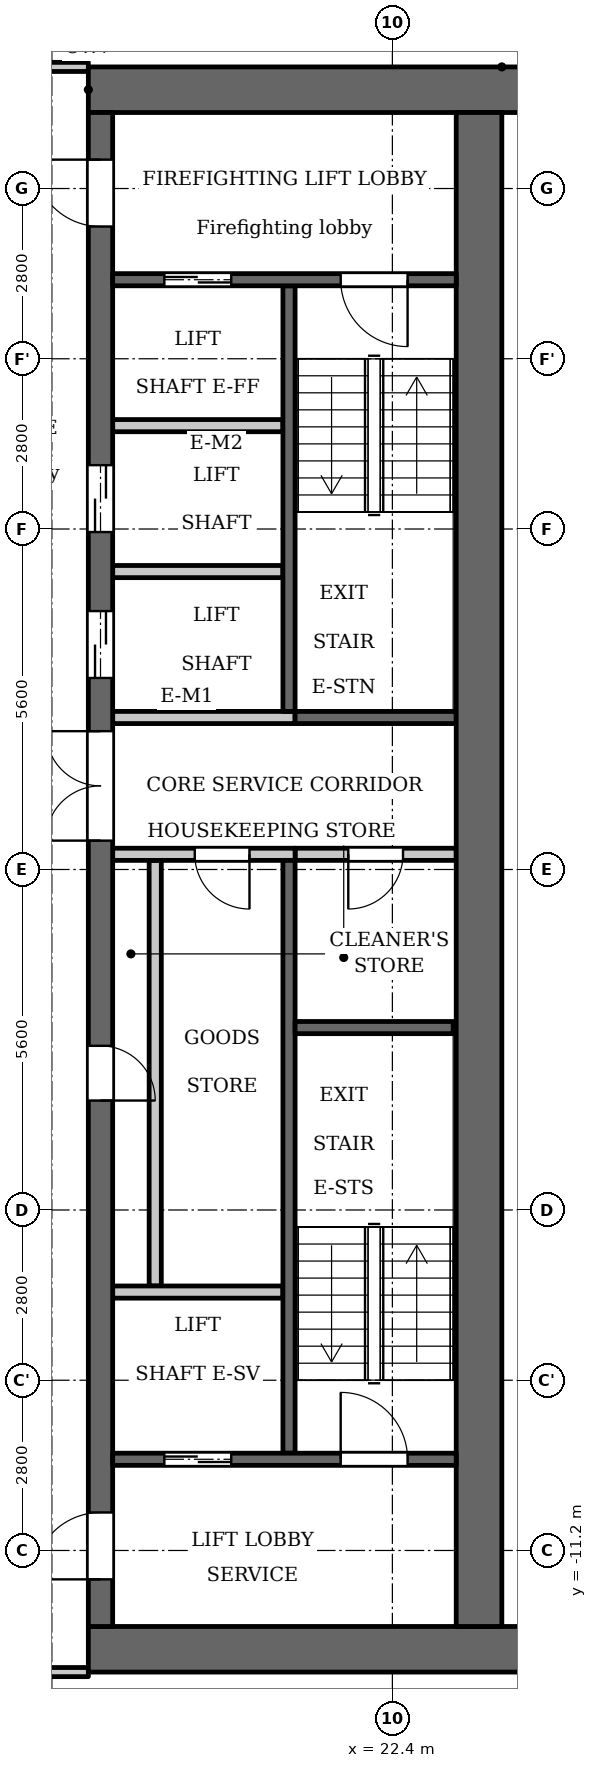
"""IFC4 building model, lengths in metres.
Left out: names, types, materials, properties, quantities, classifications, styles, units other than length and angle.
Written with IfcOpenShell. Run it as: python <this file> out.ifc"""

import sys

from ifc_helpers import new_model, si_unit, direction, frame, frame_2d, origin, place, context, subcontext, project, spatial, rectangle, extrude, element, fill, save


model = new_model("IFC4")
c1 = context("Model", 3, precision=1e-05, world=origin(), true_north=direction((0.0, 1.0)))
c2 = subcontext(c1, "Body", "Model", "MODEL_VIEW")
j1 = project(units=[si_unit("LENGTHUNIT", "METRE"), si_unit("PLANEANGLEUNIT", "RADIAN")], contexts=[c1])
p1 = place(None, origin())
s1 = spatial("IfcSite", under=j1, at=p1, CompositionType="ELEMENT")
p2 = place(p1, origin())
s2 = spatial("IfcBuilding", under=s1, at=p2, CompositionType="ELEMENT")
p3 = place(p2, frame((0.0, 0.0, 227.4)))
s3 = spatial("IfcBuildingStorey", under=s2, at=p3, CompositionType="ELEMENT", Elevation=227.4)
p4 = place(p3, frame((20.7, 2.6, 0.0), z_axis=(0.0, 0.0, 1.0), x_axis=(0.0, 1.0, 0.0)))
e1 = element("IfcWall", 1, at=p4, inside=s3, PredefinedType="SHEAR", context=c2, shape_type="SweptSolid", body=[
    extrude(rectangle(XDim=7.0, YDim=0.2, at=frame_2d((3.5, 0.0))), origin(), (0.0, 0.0, 1.0), 3.15),
])
p5 = place(p3, frame((20.7, -9.6, 0.0), z_axis=(0.0, 0.0, 1.0), x_axis=(0.0, 1.0, 0.0)))
e2 = element("IfcWall", 2, at=p5, inside=s3, PredefinedType="SHEAR", context=c2, shape_type="SweptSolid", body=[
    extrude(rectangle(XDim=9.75, YDim=0.2, at=frame_2d((4.875, 0.0))), origin(), (0.0, 0.0, 1.0), 3.15),
])
p6 = place(p3, frame((20.8, 2.5, 0.0), z_axis=(0.0, 0.0, 1.0), x_axis=(1.0, 0.0, 0.0)))
e3 = element("IfcWall", 3, at=p6, inside=s3, PredefinedType="SHEAR", context=c2, shape_type="SweptSolid", body=[
    extrude(rectangle(XDim=2.65, YDim=0.2, at=frame_2d((1.325, 0.0))), origin(), (0.0, 0.0, 1.0), 3.15),
])
p7 = place(p3, frame((20.8, 0.25, 0.0), z_axis=(0.0, 0.0, 1.0), x_axis=(1.0, 0.0, 0.0)))
e4 = element("IfcWall", 4, at=p7, inside=s3, PredefinedType="PARTITIONING", context=c2, shape_type="SweptSolid", body=[
    extrude(rectangle(XDim=2.65, YDim=0.2, at=frame_2d((1.325, 0.0))), origin(), (0.0, 0.0, 1.0), 3.15),
])
p8 = place(p7, frame((0.875, 0.0, 0.0)))
e5 = element("IfcOpeningElement", 5, at=p8, cuts=e4, PredefinedType="OPENING", context=c2, shape_type="SweptSolid", body=[
    extrude(rectangle(XDim=0.9, YDim=2.1, at=frame_2d((0.45, 1.05))), frame((0.0, 0.11, 0.0), z_axis=(0.0, -1.0, 0.0), x_axis=(1.0, 0.0, 0.0)), (0.0, 0.0, 1.0), 0.22),
])
for number, where, z_axis, x_axis in (
    (6, (17.4, 12.825, 0.0), (0.0, 0.0, 1.0), (1.0, 0.0, 0.0)),
    (7, (17.4, -12.825, 0.0), (0.0, 0.0, 1.0), (1.0, 0.0, 0.0)),
):
    element("IfcWall", number, at=place(p3, frame(where, z_axis=z_axis, x_axis=x_axis)), inside=s3, PredefinedType="SHEAR", context=c2, shape_type="SweptSolid", body=[
        extrude(rectangle(XDim=7.6, YDim=0.75, at=frame_2d((3.8, 0.0))), origin(), (0.0, 0.0, 1.0), 3.15),
    ])
p9 = place(p3, frame((18.5, -6.85, 0.0), z_axis=(0.0, 0.0, 1.0), x_axis=(0.0, 1.0, 0.0)))
e8 = element("IfcWall", 8, at=p9, inside=s3, PredefinedType="PARTITIONING", context=c2, shape_type="SweptSolid", body=[
    extrude(rectangle(XDim=7.0, YDim=0.2, at=frame_2d((3.5, 0.0))), origin(), (0.0, 0.0, 1.0), 3.15),
])
p10 = place(p3, frame((17.6, -12.45, 0.0), z_axis=(0.0, 0.0, 1.0), x_axis=(0.0, 1.0, 0.0)))
e9 = element("IfcWall", 9, at=p10, inside=s3, PredefinedType="SHEAR", context=c2, shape_type="SweptSolid", body=[
    extrude(rectangle(XDim=24.9, YDim=0.4, at=frame_2d((12.45, 0.0))), origin(), (0.0, 0.0, 1.0), 3.15),
])
p11 = place(p10, frame((8.65, 0.0, 0.0)))
e10 = element("IfcOpeningElement", 10, at=p11, cuts=e9, PredefinedType="OPENING", context=c2, shape_type="SweptSolid", body=[
    extrude(rectangle(XDim=0.9, YDim=2.1, at=frame_2d((0.45, 1.05))), frame((0.0, 0.21, 0.0), z_axis=(0.0, -1.0, 0.0), x_axis=(1.0, 0.0, 0.0)), (0.0, 0.0, 1.0), 0.42),
])
p12 = place(p10, frame((15.6, 0.0, 0.0)))
e11 = element("IfcOpeningElement", 11, at=p12, cuts=e9, PredefinedType="OPENING", context=c2, shape_type="SweptSolid", body=[
    extrude(rectangle(XDim=1.1, YDim=2.1, at=frame_2d((0.55, 1.05))), frame((0.0, 0.21, 0.0), z_axis=(0.0, -1.0, 0.0), x_axis=(1.0, 0.0, 0.0)), (0.0, 0.0, 1.0), 0.42),
])
p13 = place(p10, frame((18.0, 0.0, 0.0)))
e12 = element("IfcOpeningElement", 12, at=p13, cuts=e9, PredefinedType="OPENING", context=c2, shape_type="SweptSolid", body=[
    extrude(rectangle(XDim=1.1, YDim=2.1, at=frame_2d((0.55, 1.05))), frame((0.0, 0.21, 0.0), z_axis=(0.0, -1.0, 0.0), x_axis=(1.0, 0.0, 0.0)), (0.0, 0.0, 1.0), 0.42),
])
p14 = place(p10, frame((23.025, 0.0, 0.0)))
e13 = element("IfcOpeningElement", 13, at=p14, cuts=e9, PredefinedType="OPENING", context=c2, shape_type="SweptSolid", body=[
    extrude(rectangle(XDim=1.1, YDim=2.1, at=frame_2d((0.55, 1.05))), frame((0.0, 0.21, 0.0), z_axis=(0.0, -1.0, 0.0), x_axis=(1.0, 0.0, 0.0)), (0.0, 0.0, 1.0), 0.42),
])
p15 = place(p10, frame((0.775, 0.0, 0.0)))
e14 = element("IfcOpeningElement", 14, at=p15, cuts=e9, PredefinedType="OPENING", context=c2, shape_type="SweptSolid", body=[
    extrude(rectangle(XDim=1.1, YDim=2.1, at=frame_2d((0.55, 1.05))), frame((0.0, 0.21, 0.0), z_axis=(0.0, -1.0, 0.0), x_axis=(1.0, 0.0, 0.0)), (0.0, 0.0, 1.0), 0.42),
])
p16 = place(p10, frame((12.925, 0.0, 0.0)))
e15 = element("IfcOpeningElement", 15, at=p16, cuts=e9, PredefinedType="OPENING", context=c2, shape_type="SweptSolid", body=[
    extrude(rectangle(XDim=1.8, YDim=2.1, at=frame_2d((0.9, 1.05))), frame((0.0, 0.21, 0.0), z_axis=(0.0, -1.0, 0.0), x_axis=(1.0, 0.0, 0.0)), (0.0, 0.0, 1.0), 0.42),
])
p17 = place(p3, frame((23.825, -12.45, 0.0), z_axis=(0.0, 0.0, 1.0), x_axis=(0.0, 1.0, 0.0)))
e16 = element("IfcWall", 16, at=p17, inside=s3, PredefinedType="SHEAR", context=c2, shape_type="SweptSolid", body=[
    extrude(rectangle(XDim=24.9, YDim=0.75, at=frame_2d((12.45, 0.0))), origin(), (0.0, 0.0, 1.0), 3.15),
])
p18 = place(p3, frame((17.8, -9.7, 0.0), z_axis=(0.0, 0.0, 1.0), x_axis=(1.0, 0.0, 0.0)))
e17 = element("IfcWall", 17, at=p18, inside=s3, PredefinedType="SHEAR", context=c2, shape_type="SweptSolid", body=[
    extrude(rectangle(XDim=5.65, YDim=0.2, at=frame_2d((2.825, 0.0))), origin(), (0.0, 0.0, 1.0), 3.15),
])
p19 = place(p18, frame((0.85, 0.0, 0.0)))
e18 = element("IfcOpeningElement", 18, at=p19, cuts=e17, PredefinedType="OPENING", context=c2, shape_type="SweptSolid", body=[
    extrude(rectangle(XDim=1.1, YDim=2.1, at=frame_2d((0.55, 1.05))), frame((0.0, 0.11, 0.0), z_axis=(0.0, -1.0, 0.0), x_axis=(1.0, 0.0, 0.0)), (0.0, 0.0, 1.0), 0.22),
])
p20 = place(p18, frame((3.75, 0.0, 0.0)))
e19 = element("IfcOpeningElement", 19, at=p20, cuts=e17, PredefinedType="OPENING", context=c2, shape_type="SweptSolid", body=[
    extrude(rectangle(XDim=1.1, YDim=2.1, at=frame_2d((0.55, 1.05))), frame((0.0, 0.11, 0.0), z_axis=(0.0, -1.0, 0.0), x_axis=(1.0, 0.0, 0.0)), (0.0, 0.0, 1.0), 0.22),
])
p21 = place(p3, frame((17.8, -6.95, 0.0), z_axis=(0.0, 0.0, 1.0), x_axis=(1.0, 0.0, 0.0)))
e20 = element("IfcWall", 20, at=p21, inside=s3, PredefinedType="PARTITIONING", context=c2, shape_type="SweptSolid", body=[
    extrude(rectangle(XDim=2.8, YDim=0.2, at=frame_2d((1.4, 0.0))), origin(), (0.0, 0.0, 1.0), 3.15),
])
p22 = place(p3, frame((17.8, 0.25, 0.0), z_axis=(0.0, 0.0, 1.0), x_axis=(1.0, 0.0, 0.0)))
e21 = element("IfcWall", 21, at=p22, inside=s3, PredefinedType="PARTITIONING", context=c2, shape_type="SweptSolid", body=[
    extrude(rectangle(XDim=3.0, YDim=0.2, at=frame_2d((1.5, 0.0))), origin(), (0.0, 0.0, 1.0), 3.15),
])
p23 = place(p22, frame((1.35, 0.0, 0.0)))
e22 = element("IfcOpeningElement", 22, at=p23, cuts=e21, PredefinedType="OPENING", context=c2, shape_type="SweptSolid", body=[
    extrude(rectangle(XDim=0.9, YDim=2.1, at=frame_2d((0.45, 1.05))), frame((0.0, 0.11, 0.0), z_axis=(0.0, -1.0, 0.0), x_axis=(1.0, 0.0, 0.0)), (0.0, 0.0, 1.0), 0.22),
])
p24 = place(p3, frame((17.8, 2.5, 0.0), z_axis=(0.0, 0.0, 1.0), x_axis=(1.0, 0.0, 0.0)))
e23 = element("IfcWall", 23, at=p24, inside=s3, PredefinedType="PARTITIONING", context=c2, shape_type="SweptSolid", body=[
    extrude(rectangle(XDim=3.0, YDim=0.2, at=frame_2d((1.5, 0.0))), origin(), (0.0, 0.0, 1.0), 3.15),
])
for number, where, z_axis, x_axis in (
    (24, (17.8, 4.9, 0.0), (0.0, 0.0, 1.0), (1.0, 0.0, 0.0)),
    (25, (17.8, 7.3, 0.0), (0.0, 0.0, 1.0), (1.0, 0.0, 0.0)),
):
    element("IfcWall", number, at=place(p3, frame(where, z_axis=z_axis, x_axis=x_axis)), inside=s3, PredefinedType="PARTITIONING", context=c2, shape_type="SweptSolid", body=[
        extrude(rectangle(XDim=2.8, YDim=0.2, at=frame_2d((1.4, 0.0))), origin(), (0.0, 0.0, 1.0), 3.15),
    ])
p25 = place(p3, frame((17.8, 9.7, 0.0), z_axis=(0.0, 0.0, 1.0), x_axis=(1.0, 0.0, 0.0)))
e26 = element("IfcWall", 26, at=p25, inside=s3, PredefinedType="SHEAR", context=c2, shape_type="SweptSolid", body=[
    extrude(rectangle(XDim=5.65, YDim=0.2, at=frame_2d((2.825, 0.0))), origin(), (0.0, 0.0, 1.0), 3.15),
])
p26 = place(p25, frame((0.85, 0.0, 0.0)))
e27 = element("IfcOpeningElement", 27, at=p26, cuts=e26, PredefinedType="OPENING", context=c2, shape_type="SweptSolid", body=[
    extrude(rectangle(XDim=1.1, YDim=2.1, at=frame_2d((0.55, 1.05))), frame((0.0, 0.11, 0.0), z_axis=(0.0, -1.0, 0.0), x_axis=(1.0, 0.0, 0.0)), (0.0, 0.0, 1.0), 0.22),
])
p27 = place(p25, frame((3.75, 0.0, 0.0)))
e28 = element("IfcOpeningElement", 28, at=p27, cuts=e26, PredefinedType="OPENING", context=c2, shape_type="SweptSolid", body=[
    extrude(rectangle(XDim=1.1, YDim=2.1, at=frame_2d((0.55, 1.05))), frame((0.0, 0.11, 0.0), z_axis=(0.0, -1.0, 0.0), x_axis=(1.0, 0.0, 0.0)), (0.0, 0.0, 1.0), 0.22),
])
p28 = place(p3, frame((20.8, -2.6, 0.0), z_axis=(0.0, 0.0, 1.0), x_axis=(1.0, 0.0, 0.0)))
e29 = element("IfcWall", 29, at=p28, inside=s3, PredefinedType="SHEAR", context=c2, shape_type="SweptSolid", body=[
    extrude(rectangle(XDim=2.6, YDim=0.2, at=frame_2d((1.3, 0.0))), origin(), (0.0, 0.0, 1.0), 3.15),
])
p29 = place(p3, frame((-17.4, -13.2, 0.0), z_axis=(0.0, 0.0, 1.0), x_axis=(1.0, 0.0, 0.0)))
e30 = element("IfcWall", 30, at=p29, inside=s3, PredefinedType="PARTITIONING", context=c2, shape_type="SweptSolid", body=[
    extrude(rectangle(XDim=34.8, YDim=0.15, at=frame_2d((17.4, 0.0))), origin(), (0.0, 0.0, 1.0), 3.15),
])
p30 = place(p29, frame((0.65, 0.0, 0.0)))
e31 = element("IfcOpeningElement", 31, at=p30, cuts=e30, PredefinedType="OPENING", context=c2, shape_type="SweptSolid", body=[
    extrude(rectangle(XDim=1.0, YDim=2.1, at=frame_2d((0.5, 1.05))), frame((0.0, 0.085, 0.0), z_axis=(0.0, -1.0, 0.0), x_axis=(1.0, 0.0, 0.0)), (0.0, 0.0, 1.0), 0.17),
])
p31 = place(p29, frame((33.05, 0.0, 0.0)))
e32 = element("IfcOpeningElement", 32, at=p31, cuts=e30, PredefinedType="OPENING", context=c2, shape_type="SweptSolid", body=[
    extrude(rectangle(XDim=1.0, YDim=2.1, at=frame_2d((0.5, 1.05))), frame((0.0, 0.085, 0.0), z_axis=(0.0, -1.0, 0.0), x_axis=(1.0, 0.0, 0.0)), (0.0, 0.0, 1.0), 0.17),
])
p32 = place(p29, frame((10.15, 0.0, 0.0)))
e33 = element("IfcOpeningElement", 33, at=p32, cuts=e30, PredefinedType="OPENING", context=c2, shape_type="SweptSolid", body=[
    extrude(rectangle(XDim=1.0, YDim=2.1, at=frame_2d((0.5, 1.05))), frame((0.0, 0.085, 0.0), z_axis=(0.0, -1.0, 0.0), x_axis=(1.0, 0.0, 0.0)), (0.0, 0.0, 1.0), 0.17),
])
p33 = place(p29, frame((12.5, 0.0, 0.0)))
e34 = element("IfcOpeningElement", 34, at=p33, cuts=e30, PredefinedType="OPENING", context=c2, shape_type="SweptSolid", body=[
    extrude(rectangle(XDim=1.0, YDim=2.1, at=frame_2d((0.5, 1.05))), frame((0.0, 0.085, 0.0), z_axis=(0.0, -1.0, 0.0), x_axis=(1.0, 0.0, 0.0)), (0.0, 0.0, 1.0), 0.17),
])
p34 = place(p29, frame((18.0, 0.0, 0.0)))
e35 = element("IfcOpeningElement", 35, at=p34, cuts=e30, PredefinedType="OPENING", context=c2, shape_type="SweptSolid", body=[
    extrude(rectangle(XDim=1.0, YDim=2.1, at=frame_2d((0.5, 1.05))), frame((0.0, 0.085, 0.0), z_axis=(0.0, -1.0, 0.0), x_axis=(1.0, 0.0, 0.0)), (0.0, 0.0, 1.0), 0.17),
])
p35 = place(p29, frame((30.75, 0.0, 0.0)))
e36 = element("IfcOpeningElement", 36, at=p35, cuts=e30, PredefinedType="OPENING", context=c2, shape_type="SweptSolid", body=[
    extrude(rectangle(XDim=1.0, YDim=2.1, at=frame_2d((0.5, 1.05))), frame((0.0, 0.085, 0.0), z_axis=(0.0, -1.0, 0.0), x_axis=(1.0, 0.0, 0.0)), (0.0, 0.0, 1.0), 0.17),
])
p36 = place(p3, frame((-17.4, 13.2, 0.0), z_axis=(0.0, 0.0, 1.0), x_axis=(1.0, 0.0, 0.0)))
e37 = element("IfcWall", 37, at=p36, inside=s3, PredefinedType="PARTITIONING", context=c2, shape_type="SweptSolid", body=[
    extrude(rectangle(XDim=34.8, YDim=0.15, at=frame_2d((17.4, 0.0))), origin(), (0.0, 0.0, 1.0), 3.15),
])
p37 = place(p36, frame((0.75, 0.0, 0.0)))
e38 = element("IfcOpeningElement", 38, at=p37, cuts=e37, PredefinedType="OPENING", context=c2, shape_type="SweptSolid", body=[
    extrude(rectangle(XDim=1.0, YDim=2.1, at=frame_2d((0.5, 1.05))), frame((0.0, 0.085, 0.0), z_axis=(0.0, -1.0, 0.0), x_axis=(1.0, 0.0, 0.0)), (0.0, 0.0, 1.0), 0.17),
])
p38 = place(p36, frame((33.15, 0.0, 0.0)))
e39 = element("IfcOpeningElement", 39, at=p38, cuts=e37, PredefinedType="OPENING", context=c2, shape_type="SweptSolid", body=[
    extrude(rectangle(XDim=1.0, YDim=2.1, at=frame_2d((0.5, 1.05))), frame((0.0, 0.085, 0.0), z_axis=(0.0, -1.0, 0.0), x_axis=(1.0, 0.0, 0.0)), (0.0, 0.0, 1.0), 0.17),
])
p39 = place(p36, frame((3.05, 0.0, 0.0)))
e40 = element("IfcOpeningElement", 40, at=p39, cuts=e37, PredefinedType="OPENING", context=c2, shape_type="SweptSolid", body=[
    extrude(rectangle(XDim=1.0, YDim=2.1, at=frame_2d((0.5, 1.05))), frame((0.0, 0.085, 0.0), z_axis=(0.0, -1.0, 0.0), x_axis=(1.0, 0.0, 0.0)), (0.0, 0.0, 1.0), 0.17),
])
p40 = place(p36, frame((10.1, 0.0, 0.0)))
e41 = element("IfcOpeningElement", 41, at=p40, cuts=e37, PredefinedType="OPENING", context=c2, shape_type="SweptSolid", body=[
    extrude(rectangle(XDim=1.0, YDim=2.1, at=frame_2d((0.5, 1.05))), frame((0.0, 0.085, 0.0), z_axis=(0.0, -1.0, 0.0), x_axis=(1.0, 0.0, 0.0)), (0.0, 0.0, 1.0), 0.17),
])
p41 = place(p36, frame((12.45, 0.0, 0.0)))
e42 = element("IfcOpeningElement", 42, at=p41, cuts=e37, PredefinedType="OPENING", context=c2, shape_type="SweptSolid", body=[
    extrude(rectangle(XDim=1.0, YDim=2.1, at=frame_2d((0.5, 1.05))), frame((0.0, 0.085, 0.0), z_axis=(0.0, -1.0, 0.0), x_axis=(1.0, 0.0, 0.0)), (0.0, 0.0, 1.0), 0.17),
])
p42 = place(p36, frame((21.3, 0.0, 0.0)))
e43 = element("IfcOpeningElement", 43, at=p42, cuts=e37, PredefinedType="OPENING", context=c2, shape_type="SweptSolid", body=[
    extrude(rectangle(XDim=1.0, YDim=2.1, at=frame_2d((0.5, 1.05))), frame((0.0, 0.085, 0.0), z_axis=(0.0, -1.0, 0.0), x_axis=(1.0, 0.0, 0.0)), (0.0, 0.0, 1.0), 0.17),
])
p43 = place(p36, frame((23.65, 0.0, 0.0)))
e44 = element("IfcOpeningElement", 44, at=p43, cuts=e37, PredefinedType="OPENING", context=c2, shape_type="SweptSolid", body=[
    extrude(rectangle(XDim=1.0, YDim=2.1, at=frame_2d((0.5, 1.05))), frame((0.0, 0.085, 0.0), z_axis=(0.0, -1.0, 0.0), x_axis=(1.0, 0.0, 0.0)), (0.0, 0.0, 1.0), 0.17),
])
p44 = place(p36, frame((30.75, 0.0, 0.0)))
e45 = element("IfcOpeningElement", 45, at=p44, cuts=e37, PredefinedType="OPENING", context=c2, shape_type="SweptSolid", body=[
    extrude(rectangle(XDim=1.0, YDim=2.1, at=frame_2d((0.5, 1.05))), frame((0.0, 0.085, 0.0), z_axis=(0.0, -1.0, 0.0), x_axis=(1.0, 0.0, 0.0)), (0.0, 0.0, 1.0), 0.17),
])
p45 = place(p19, origin())
e46 = element("IfcDoor", 46, at=p45, inside=s3, OperationType="DOUBLE_DOOR_SLIDING", PredefinedType="DOOR", context=c2, shape_type="SweptSolid", body=[
    extrude(rectangle(XDim=1.1, YDim=2.1, at=frame_2d((0.55, 1.05))), frame((0.0, 0.025, 0.0), z_axis=(0.0, -1.0, 0.0), x_axis=(1.0, 0.0, 0.0)), (0.0, 0.0, 1.0), 0.05),
])
fill(e18, e46)
p46 = place(p11, origin())
e47 = element("IfcDoor", 47, at=p46, inside=s3, OperationType="SINGLE_SWING_LEFT", PredefinedType="DOOR", context=c2, shape_type="SweptSolid", body=[
    extrude(rectangle(XDim=0.9, YDim=2.1, at=frame_2d((0.45, 1.05))), frame((0.0, 0.025, 0.0), z_axis=(0.0, -1.0, 0.0), x_axis=(1.0, 0.0, 0.0)), (0.0, 0.0, 1.0), 0.05),
])
fill(e10, e47)
p47 = place(p23, origin())
e48 = element("IfcDoor", 48, at=p47, inside=s3, OperationType="SINGLE_SWING_RIGHT", PredefinedType="DOOR", context=c2, shape_type="SweptSolid", body=[
    extrude(rectangle(XDim=0.9, YDim=2.1, at=frame_2d((0.45, 1.05))), frame((0.0, 0.025, 0.0), z_axis=(0.0, -1.0, 0.0), x_axis=(1.0, 0.0, 0.0)), (0.0, 0.0, 1.0), 0.05),
])
fill(e22, e48)
p48 = place(p12, origin())
e49 = element("IfcDoor", 49, at=p48, inside=s3, OperationType="DOUBLE_DOOR_SLIDING", PredefinedType="DOOR", context=c2, shape_type="SweptSolid", body=[
    extrude(rectangle(XDim=1.1, YDim=2.1, at=frame_2d((0.55, 1.05))), frame((0.0, 0.025, 0.0), z_axis=(0.0, -1.0, 0.0), x_axis=(1.0, 0.0, 0.0)), (0.0, 0.0, 1.0), 0.05),
])
fill(e11, e49)
p49 = place(p13, origin())
e50 = element("IfcDoor", 50, at=p49, inside=s3, OperationType="DOUBLE_DOOR_SLIDING", PredefinedType="DOOR", context=c2, shape_type="SweptSolid", body=[
    extrude(rectangle(XDim=1.1, YDim=2.1, at=frame_2d((0.55, 1.05))), frame((0.0, 0.025, 0.0), z_axis=(0.0, -1.0, 0.0), x_axis=(1.0, 0.0, 0.0)), (0.0, 0.0, 1.0), 0.05),
])
fill(e12, e50)
p50 = place(p26, origin())
e51 = element("IfcDoor", 51, at=p50, inside=s3, OperationType="DOUBLE_DOOR_SLIDING", PredefinedType="DOOR", context=c2, shape_type="SweptSolid", body=[
    extrude(rectangle(XDim=1.1, YDim=2.1, at=frame_2d((0.55, 1.05))), frame((0.0, 0.025, 0.0), z_axis=(0.0, -1.0, 0.0), x_axis=(1.0, 0.0, 0.0)), (0.0, 0.0, 1.0), 0.05),
])
fill(e27, e51)
p51 = place(p14, origin())
e52 = element("IfcDoor", 52, at=p51, inside=s3, OperationType="SINGLE_SWING_LEFT", PredefinedType="DOOR", context=c2, shape_type="SweptSolid", body=[
    extrude(rectangle(XDim=1.1, YDim=2.1, at=frame_2d((0.55, 1.05))), frame((0.0, 0.025, 0.0), z_axis=(0.0, -1.0, 0.0), x_axis=(1.0, 0.0, 0.0)), (0.0, 0.0, 1.0), 0.05),
])
fill(e13, e52)
p52 = place(p15, origin())
e53 = element("IfcDoor", 53, at=p52, inside=s3, OperationType="SINGLE_SWING_RIGHT", PredefinedType="DOOR", context=c2, shape_type="SweptSolid", body=[
    extrude(rectangle(XDim=1.1, YDim=2.1, at=frame_2d((0.55, 1.05))), frame((0.0, 0.025, 0.0), z_axis=(0.0, -1.0, 0.0), x_axis=(1.0, 0.0, 0.0)), (0.0, 0.0, 1.0), 0.05),
])
fill(e14, e53)
p53 = place(p27, origin())
e54 = element("IfcDoor", 54, at=p53, inside=s3, OperationType="SINGLE_SWING_RIGHT", PredefinedType="DOOR", context=c2, shape_type="SweptSolid", body=[
    extrude(rectangle(XDim=1.1, YDim=2.1, at=frame_2d((0.55, 1.05))), frame((0.0, 0.025, 0.0), z_axis=(0.0, -1.0, 0.0), x_axis=(1.0, 0.0, 0.0)), (0.0, 0.0, 1.0), 0.05),
])
fill(e28, e54)
p54 = place(p20, origin())
e55 = element("IfcDoor", 55, at=p54, inside=s3, OperationType="SINGLE_SWING_RIGHT", PredefinedType="DOOR", context=c2, shape_type="SweptSolid", body=[
    extrude(rectangle(XDim=1.1, YDim=2.1, at=frame_2d((0.55, 1.05))), frame((0.0, 0.025, 0.0), z_axis=(0.0, -1.0, 0.0), x_axis=(1.0, 0.0, 0.0)), (0.0, 0.0, 1.0), 0.05),
])
fill(e19, e55)
p55 = place(p16, origin())
e56 = element("IfcDoor", 56, at=p55, inside=s3, OperationType="DOUBLE_DOOR_SINGLE_SWING", PredefinedType="DOOR", context=c2, shape_type="SweptSolid", body=[
    extrude(rectangle(XDim=1.8, YDim=2.1, at=frame_2d((0.9, 1.05))), frame((0.0, 0.025, 0.0), z_axis=(0.0, -1.0, 0.0), x_axis=(1.0, 0.0, 0.0)), (0.0, 0.0, 1.0), 0.05),
])
fill(e15, e56)
p56 = place(p8, origin())
e57 = element("IfcDoor", 57, at=p56, inside=s3, OperationType="SINGLE_SWING_LEFT", PredefinedType="DOOR", context=c2, shape_type="SweptSolid", body=[
    extrude(rectangle(XDim=0.9, YDim=2.1, at=frame_2d((0.45, 1.05))), frame((0.0, 0.025, 0.0), z_axis=(0.0, -1.0, 0.0), x_axis=(1.0, 0.0, 0.0)), (0.0, 0.0, 1.0), 0.05),
])
fill(e5, e57)
save(model, sys.argv[1])
